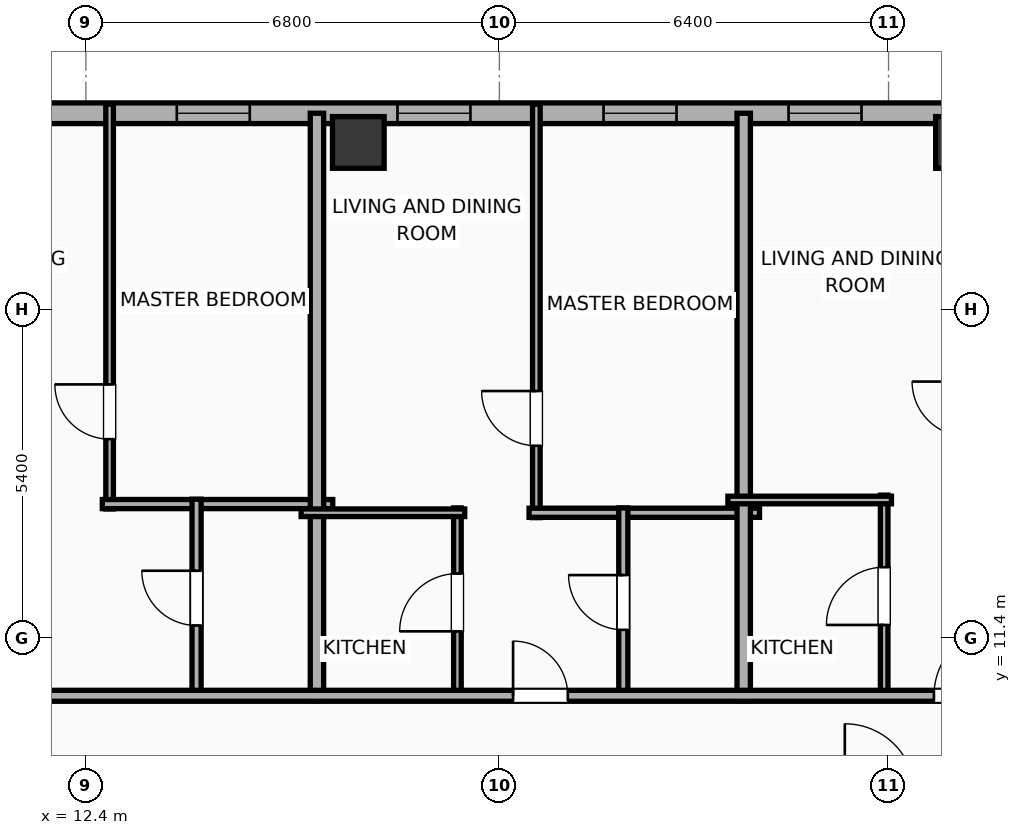
"""IFC4 building model, lengths in metres.
Left out: names, types, materials, properties, quantities, classifications, styles, units other than length and angle.
Written with IfcOpenShell. Run it as: python <this file> out.ifc"""

import sys

from ifc_helpers import new_model, si_unit, direction, frame, frame_2d, origin, origin_2d, place, context, subcontext, project, spatial, rectangle, hollow_rectangle, extrude, element, fill, save


model = new_model("IFC4")
c1 = context("Model", 3, precision=1e-05, world=origin(), true_north=direction((0.0, 1.0)))
c2 = subcontext(c1, "Body", "Model", "MODEL_VIEW")
j1 = project(units=[si_unit("LENGTHUNIT", "METRE"), si_unit("PLANEANGLEUNIT", "RADIAN")], contexts=[c1])
p1 = place(None, origin())
s1 = spatial("IfcSite", under=j1, at=p1, CompositionType="ELEMENT")
p2 = place(p1, origin())
s2 = spatial("IfcBuilding", under=s1, at=p2, CompositionType="ELEMENT")
p3 = place(p2, frame((0.0, 0.0, 204.1)))
s3 = spatial("IfcBuildingStorey", under=s2, at=p3, CompositionType="ELEMENT", Elevation=204.1)
for number, where, z_axis, x_axis in (
    (1, (26.8, 19.55, 0.0), (0.0, 0.0, 1.0), (1.0, 0.0, 0.0)),
    (2, (16.88, 19.55, 0.0), (0.0, 0.0, 1.0), (1.0, 0.0, 0.0)),
):
    element("IfcColumn", number, at=place(p3, frame(where, z_axis=z_axis, x_axis=x_axis)), inside=s3, PredefinedType="COLUMN", context=c2, shape_type="SweptSolid", body=[
        extrude(hollow_rectangle(XDim=0.85, YDim=0.85, WallThickness=0.028, at=origin_2d()), origin(), (0.0, 0.0, 1.0), 3.9),
    ])
p4 = place(p3, frame((-22.783, 20.03, 0.0), z_axis=(0.0, 0.0, 1.0), x_axis=(1.0, 0.0, 0.0)))
e3 = element("IfcWall", 3, at=p4, inside=s3, PredefinedType="ELEMENTEDWALL", context=c2, shape_type="SweptSolid", body=[
    extrude(rectangle(XDim=49.566, YDim=0.34, at=frame_2d((24.783, 0.0))), origin(), (0.0, 0.0, 1.0), 3.65),
])
p5 = place(p4, frame((6.211, 0.0, 0.75)))
e4 = element("IfcOpeningElement", 4, at=p5, cuts=e3, PredefinedType="OPENING", context=c2, shape_type="SweptSolid", body=[
    extrude(rectangle(XDim=2.4, YDim=2.1, at=frame_2d((1.2, 1.05))), frame((0.0, 0.18, 0.0), z_axis=(0.0, -1.0, 0.0), x_axis=(1.0, 0.0, 0.0)), (0.0, 0.0, 1.0), 0.36),
])
p6 = place(p4, frame((22.733, 0.0, 0.75)))
e5 = element("IfcOpeningElement", 5, at=p6, cuts=e3, PredefinedType="OPENING", context=c2, shape_type="SweptSolid", body=[
    extrude(rectangle(XDim=2.4, YDim=2.1, at=frame_2d((1.2, 1.05))), frame((0.0, 0.18, 0.0), z_axis=(0.0, -1.0, 0.0), x_axis=(1.0, 0.0, 0.0)), (0.0, 0.0, 1.0), 0.36),
])
p7 = place(p4, frame((1.132, 0.0, 0.75)))
e6 = element("IfcOpeningElement", 6, at=p7, cuts=e3, PredefinedType="OPENING", context=c2, shape_type="SweptSolid", body=[
    extrude(rectangle(XDim=1.2, YDim=2.05, at=frame_2d((0.6, 1.025))), frame((0.0, 0.18, 0.0), z_axis=(0.0, -1.0, 0.0), x_axis=(1.0, 0.0, 0.0)), (0.0, 0.0, 1.0), 0.36),
])
p8 = place(p4, frame((3.678, 0.0, 0.75)))
e7 = element("IfcOpeningElement", 7, at=p8, cuts=e3, PredefinedType="OPENING", context=c2, shape_type="SweptSolid", body=[
    extrude(rectangle(XDim=1.2, YDim=2.05, at=frame_2d((0.6, 1.025))), frame((0.0, 0.18, 0.0), z_axis=(0.0, -1.0, 0.0), x_axis=(1.0, 0.0, 0.0)), (0.0, 0.0, 1.0), 0.36),
])
p9 = place(p4, frame((14.804, 0.0, 0.75)))
e8 = element("IfcOpeningElement", 8, at=p9, cuts=e3, PredefinedType="OPENING", context=c2, shape_type="SweptSolid", body=[
    extrude(rectangle(XDim=1.2, YDim=2.05, at=frame_2d((0.6, 1.025))), frame((0.0, 0.18, 0.0), z_axis=(0.0, -1.0, 0.0), x_axis=(1.0, 0.0, 0.0)), (0.0, 0.0, 1.0), 0.36),
])
p10 = place(p4, frame((12.054, 0.0, 0.75)))
e9 = element("IfcOpeningElement", 9, at=p10, cuts=e3, PredefinedType="OPENING", context=c2, shape_type="SweptSolid", body=[
    extrude(rectangle(XDim=1.2, YDim=2.05, at=frame_2d((0.6, 1.025))), frame((0.0, 0.18, 0.0), z_axis=(0.0, -1.0, 0.0), x_axis=(1.0, 0.0, 0.0)), (0.0, 0.0, 1.0), 0.36),
])
p11 = place(p4, frame((17.933, 0.0, 0.75)))
e10 = element("IfcOpeningElement", 10, at=p11, cuts=e3, PredefinedType="OPENING", context=c2, shape_type="SweptSolid", body=[
    extrude(rectangle(XDim=1.2, YDim=2.05, at=frame_2d((0.6, 1.025))), frame((0.0, 0.18, 0.0), z_axis=(0.0, -1.0, 0.0), x_axis=(1.0, 0.0, 0.0)), (0.0, 0.0, 1.0), 0.36),
])
p12 = place(p4, frame((26.278, 0.0, 0.75)))
e11 = element("IfcOpeningElement", 11, at=p12, cuts=e3, PredefinedType="OPENING", context=c2, shape_type="SweptSolid", body=[
    extrude(rectangle(XDim=1.2, YDim=2.05, at=frame_2d((0.6, 1.025))), frame((0.0, 0.18, 0.0), z_axis=(0.0, -1.0, 0.0), x_axis=(1.0, 0.0, 0.0)), (0.0, 0.0, 1.0), 0.36),
])
p13 = place(p4, frame((32.677, 0.0, 0.75)))
e12 = element("IfcOpeningElement", 12, at=p13, cuts=e3, PredefinedType="OPENING", context=c2, shape_type="SweptSolid", body=[
    extrude(rectangle(XDim=1.2, YDim=2.05, at=frame_2d((0.6, 1.025))), frame((0.0, 0.18, 0.0), z_axis=(0.0, -1.0, 0.0), x_axis=(1.0, 0.0, 0.0)), (0.0, 0.0, 1.0), 0.36),
])
p14 = place(p4, frame((28.217, 0.0, 0.75)))
e13 = element("IfcOpeningElement", 13, at=p14, cuts=e3, PredefinedType="OPENING", context=c2, shape_type="SweptSolid", body=[
    extrude(rectangle(XDim=0.85, YDim=2.05, at=frame_2d((0.425, 1.025))), frame((0.0, 0.18, 0.0), z_axis=(0.0, -1.0, 0.0), x_axis=(1.0, 0.0, 0.0)), (0.0, 0.0, 1.0), 0.36),
])
p15 = place(p4, frame((36.678, 0.0, 0.75)))
e14 = element("IfcOpeningElement", 14, at=p15, cuts=e3, PredefinedType="OPENING", context=c2, shape_type="SweptSolid", body=[
    extrude(rectangle(XDim=1.2, YDim=2.05, at=frame_2d((0.6, 1.025))), frame((0.0, 0.18, 0.0), z_axis=(0.0, -1.0, 0.0), x_axis=(1.0, 0.0, 0.0)), (0.0, 0.0, 1.0), 0.36),
])
p16 = place(p4, frame((40.307, 0.0, 0.75)))
e15 = element("IfcOpeningElement", 15, at=p16, cuts=e3, PredefinedType="OPENING", context=c2, shape_type="SweptSolid", body=[
    extrude(rectangle(XDim=1.2, YDim=2.05, at=frame_2d((0.6, 1.025))), frame((0.0, 0.18, 0.0), z_axis=(0.0, -1.0, 0.0), x_axis=(1.0, 0.0, 0.0)), (0.0, 0.0, 1.0), 0.36),
])
p17 = place(p4, frame((43.696, 0.0, 0.75)))
e16 = element("IfcOpeningElement", 16, at=p17, cuts=e3, PredefinedType="OPENING", context=c2, shape_type="SweptSolid", body=[
    extrude(rectangle(XDim=1.2, YDim=2.05, at=frame_2d((0.6, 1.025))), frame((0.0, 0.18, 0.0), z_axis=(0.0, -1.0, 0.0), x_axis=(1.0, 0.0, 0.0)), (0.0, 0.0, 1.0), 0.36),
])
p18 = place(p4, frame((46.739, 0.0, 0.75)))
e17 = element("IfcOpeningElement", 17, at=p18, cuts=e3, PredefinedType="OPENING", context=c2, shape_type="SweptSolid", body=[
    extrude(rectangle(XDim=1.2, YDim=2.05, at=frame_2d((0.6, 1.025))), frame((0.0, 0.18, 0.0), z_axis=(0.0, -1.0, 0.0), x_axis=(1.0, 0.0, 0.0)), (0.0, 0.0, 1.0), 0.36),
])
p19 = place(p3, frame((12.79, 13.523, 0.0), z_axis=(0.0, 0.0, 1.0), x_axis=(0.0, 1.0, 0.0)))
e18 = element("IfcWall", 18, at=p19, inside=s3, PredefinedType="PARTITIONING", context=c2, shape_type="SweptSolid", body=[
    extrude(rectangle(XDim=6.657, YDim=0.125, at=frame_2d((3.329, 0.0))), origin(), (0.0, 0.0, 1.0), 3.65),
])
p20 = place(p19, frame((1.148, 0.0, 0.0)))
e19 = element("IfcOpeningElement", 19, at=p20, cuts=e18, PredefinedType="OPENING", context=c2, shape_type="SweptSolid", body=[
    extrude(rectangle(XDim=0.9, YDim=2.05, at=frame_2d((0.45, 1.025))), frame((0.0, 0.073, 0.0), z_axis=(0.0, -1.0, 0.0), x_axis=(1.0, 0.0, 0.0)), (0.0, 0.0, 1.0), 0.145),
])
p21 = place(p3, frame((12.67, 13.603, 0.0), z_axis=(0.0, 0.0, 1.0), x_axis=(1.0, 0.0, 0.0)))
e20 = element("IfcWall", 20, at=p21, inside=s3, PredefinedType="PLUMBINGWALL", context=c2, shape_type="SweptSolid", body=[
    extrude(rectangle(XDim=3.79, YDim=0.15, at=frame_2d((1.895, 0.0))), origin(), (0.0, 0.0, 1.0), 3.65),
])
p22 = place(p3, frame((14.22, 10.43, 0.0), z_axis=(0.0, 0.0, 1.0), x_axis=(0.0, 1.0, 0.0)))
e21 = element("IfcWall", 21, at=p22, inside=s3, PredefinedType="PLUMBINGWALL", context=c2, shape_type="SweptSolid", body=[
    extrude(rectangle(XDim=3.253, YDim=0.15, at=frame_2d((1.626, 0.0))), origin(), (0.0, 0.0, 1.0), 3.65),
])
p23 = place(p22, frame((1.177, 0.0, 0.0)))
e22 = element("IfcOpeningElement", 22, at=p23, cuts=e21, PredefinedType="OPENING", context=c2, shape_type="SweptSolid", body=[
    extrude(rectangle(XDim=0.9, YDim=2.05, at=frame_2d((0.45, 1.025))), frame((0.0, 0.085, 0.0), z_axis=(0.0, -1.0, 0.0), x_axis=(1.0, 0.0, 0.0)), (0.0, 0.0, 1.0), 0.17),
])
p24 = place(p3, frame((16.2, 10.37, 0.0), z_axis=(0.0, 0.0, 1.0), x_axis=(0.0, 1.0, 0.0)))
e23 = element("IfcWall", 23, at=p24, inside=s3, PredefinedType="PARTITIONING", context=c2, shape_type="SweptSolid", body=[
    extrude(rectangle(XDim=9.66, YDim=0.22, at=frame_2d((4.83, 0.0))), origin(), (0.0, 0.0, 1.0), 3.09),
])
p25 = place(p3, frame((19.808, 13.38, 0.0), z_axis=(0.0, 0.0, 1.0), x_axis=(0.0, 1.0, 0.0)))
e24 = element("IfcWall", 24, at=p25, inside=s3, PredefinedType="PARTITIONING", context=c2, shape_type="SweptSolid", body=[
    extrude(rectangle(XDim=6.8, YDim=0.125, at=frame_2d((3.4, 0.0))), origin(), (0.0, 0.0, 1.0), 3.65),
])
p26 = place(p25, frame((1.182, 0.0, 0.0)))
e25 = element("IfcOpeningElement", 25, at=p26, cuts=e24, PredefinedType="OPENING", context=c2, shape_type="SweptSolid", body=[
    extrude(rectangle(XDim=0.9, YDim=2.05, at=frame_2d((0.45, 1.025))), frame((0.0, 0.073, 0.0), z_axis=(0.0, -1.0, 0.0), x_axis=(1.0, 0.0, 0.0)), (0.0, 0.0, 1.0), 0.145),
])
p27 = place(p3, frame((19.688, 13.46, 0.0), z_axis=(0.0, 0.0, 1.0), x_axis=(1.0, 0.0, 0.0)))
e26 = element("IfcWall", 26, at=p27, inside=s3, PredefinedType="PLUMBINGWALL", context=c2, shape_type="SweptSolid", body=[
    extrude(rectangle(XDim=3.79, YDim=0.15, at=frame_2d((1.895, 0.0))), origin(), (0.0, 0.0, 1.0), 3.65),
])
p28 = place(p3, frame((18.51, 10.43, 0.0), z_axis=(0.0, 0.0, 1.0), x_axis=(0.0, 1.0, 0.0)))
e27 = element("IfcWall", 27, at=p28, inside=s3, PredefinedType="PARTITIONING", context=c2, shape_type="SweptSolid", body=[
    extrude(rectangle(XDim=3.11, YDim=0.125, at=frame_2d((1.555, 0.0))), origin(), (0.0, 0.0, 1.0), 3.65),
])
p29 = place(p28, frame((1.08, 0.0, 0.0)))
e28 = element("IfcOpeningElement", 28, at=p29, cuts=e27, PredefinedType="OPENING", context=c2, shape_type="SweptSolid", body=[
    extrude(rectangle(XDim=0.95, YDim=2.05, at=frame_2d((0.475, 1.025))), frame((0.0, 0.073, 0.0), z_axis=(0.0, -1.0, 0.0), x_axis=(1.0, 0.0, 0.0)), (0.0, 0.0, 1.0), 0.145),
])
p30 = place(p3, frame((15.94, 13.46, 0.0), z_axis=(0.0, 0.0, 1.0), x_axis=(1.0, 0.0, 0.0)))
e29 = element("IfcWall", 29, at=p30, inside=s3, PredefinedType="PARTITIONING", context=c2, shape_type="SweptSolid", body=[
    extrude(rectangle(XDim=2.69, YDim=0.125, at=frame_2d((1.345, 0.0))), origin(), (0.0, 0.0, 1.0), 3.65),
])
p31 = place(p3, frame((21.238, 10.43, 0.0), z_axis=(0.0, 0.0, 1.0), x_axis=(0.0, 1.0, 0.0)))
e30 = element("IfcWall", 30, at=p31, inside=s3, PredefinedType="PLUMBINGWALL", context=c2, shape_type="SweptSolid", body=[
    extrude(rectangle(XDim=3.11, YDim=0.15, at=frame_2d((1.555, 0.0))), origin(), (0.0, 0.0, 1.0), 3.65),
])
p32 = place(p31, frame((1.105, 0.0, 0.0)))
e31 = element("IfcOpeningElement", 31, at=p32, cuts=e30, PredefinedType="OPENING", context=c2, shape_type="SweptSolid", body=[
    extrude(rectangle(XDim=0.9, YDim=2.05, at=frame_2d((0.45, 1.025))), frame((0.0, 0.085, 0.0), z_axis=(0.0, -1.0, 0.0), x_axis=(1.0, 0.0, 0.0)), (0.0, 0.0, 1.0), 0.17),
])
p33 = place(p3, frame((23.218, 10.37, 0.0), z_axis=(0.0, 0.0, 1.0), x_axis=(0.0, 1.0, 0.0)))
e32 = element("IfcWall", 32, at=p33, inside=s3, PredefinedType="PARTITIONING", context=c2, shape_type="SweptSolid", body=[
    extrude(rectangle(XDim=9.66, YDim=0.22, at=frame_2d((4.83, 0.0))), origin(), (0.0, 0.0, 1.0), 3.65),
])
p34 = place(p3, frame((25.528, 10.43, 0.0), z_axis=(0.0, 0.0, 1.0), x_axis=(0.0, 1.0, 0.0)))
e33 = element("IfcWall", 33, at=p34, inside=s3, PredefinedType="PARTITIONING", context=c2, shape_type="SweptSolid", body=[
    extrude(rectangle(XDim=3.32, YDim=0.125, at=frame_2d((1.66, 0.0))), origin(), (0.0, 0.0, 1.0), 3.65),
])
p35 = place(p34, frame((1.185, 0.0, 0.0)))
e34 = element("IfcOpeningElement", 34, at=p35, cuts=e33, PredefinedType="OPENING", context=c2, shape_type="SweptSolid", body=[
    extrude(rectangle(XDim=0.95, YDim=2.05, at=frame_2d((0.475, 1.025))), frame((0.0, 0.073, 0.0), z_axis=(0.0, -1.0, 0.0), x_axis=(1.0, 0.0, 0.0)), (0.0, 0.0, 1.0), 0.145),
])
p36 = place(p3, frame((22.958, 13.67, 0.0), z_axis=(0.0, 0.0, 1.0), x_axis=(1.0, 0.0, 0.0)))
e35 = element("IfcWall", 35, at=p36, inside=s3, PredefinedType="PARTITIONING", context=c2, shape_type="SweptSolid", body=[
    extrude(rectangle(XDim=2.69, YDim=0.125, at=frame_2d((1.345, 0.0))), origin(), (0.0, 0.0, 1.0), 3.65),
])
p37 = place(p3, frame((-26.23, 10.45, 0.0), z_axis=(0.0, 0.0, 1.0), x_axis=(1.0, 0.0, 0.0)))
e36 = element("IfcWall", 36, at=p37, inside=s3, PredefinedType="PARTITIONING", context=c2, shape_type="SweptSolid", body=[
    extrude(rectangle(XDim=56.46, YDim=0.18, at=frame_2d((28.23, 0.0))), origin(), (0.0, 0.0, 1.0), 3.65),
])
p38 = place(p37, frame((4.41, 0.0, 0.0)))
e37 = element("IfcOpeningElement", 37, at=p38, cuts=e36, PredefinedType="OPENING", context=c2, shape_type="SweptSolid", body=[
    extrude(rectangle(XDim=1.15, YDim=2.05, at=frame_2d((0.575, 1.025))), frame((0.0, 0.1, 0.0), z_axis=(0.0, -1.0, 0.0), x_axis=(1.0, 0.0, 0.0)), (0.0, 0.0, 1.0), 0.2),
])
p39 = place(p37, frame((11.943, 0.0, 0.0)))
e38 = element("IfcOpeningElement", 38, at=p39, cuts=e36, PredefinedType="OPENING", context=c2, shape_type="SweptSolid", body=[
    extrude(rectangle(XDim=0.9, YDim=2.05, at=frame_2d((0.45, 1.025))), frame((0.0, 0.1, 0.0), z_axis=(0.0, -1.0, 0.0), x_axis=(1.0, 0.0, 0.0)), (0.0, 0.0, 1.0), 0.2),
])
p40 = place(p37, frame((18.243, 0.0, 0.0)))
e39 = element("IfcOpeningElement", 39, at=p40, cuts=e36, PredefinedType="OPENING", context=c2, shape_type="SweptSolid", body=[
    extrude(rectangle(XDim=1.15, YDim=2.05, at=frame_2d((0.575, 1.025))), frame((0.0, 0.1, 0.0), z_axis=(0.0, -1.0, 0.0), x_axis=(1.0, 0.0, 0.0)), (0.0, 0.0, 1.0), 0.2),
])
p41 = place(p37, frame((22.941, 0.0, 0.0)))
e40 = element("IfcOpeningElement", 40, at=p41, cuts=e36, PredefinedType="OPENING", context=c2, shape_type="SweptSolid", body=[
    extrude(rectangle(XDim=0.9, YDim=2.05, at=frame_2d((0.45, 1.025))), frame((0.0, 0.1, 0.0), z_axis=(0.0, -1.0, 0.0), x_axis=(1.0, 0.0, 0.0)), (0.0, 0.0, 1.0), 0.2),
])
p42 = place(p37, frame((27.028, 0.0, 0.0)))
e41 = element("IfcOpeningElement", 41, at=p42, cuts=e36, PredefinedType="OPENING", context=c2, shape_type="SweptSolid", body=[
    extrude(rectangle(XDim=1.15, YDim=2.05, at=frame_2d((0.575, 1.025))), frame((0.0, 0.1, 0.0), z_axis=(0.0, -1.0, 0.0), x_axis=(1.0, 0.0, 0.0)), (0.0, 0.0, 1.0), 0.2),
])
p43 = place(p37, frame((36.864, 0.0, 0.0)))
e42 = element("IfcOpeningElement", 42, at=p43, cuts=e36, PredefinedType="OPENING", context=c2, shape_type="SweptSolid", body=[
    extrude(rectangle(XDim=1.15, YDim=2.05, at=frame_2d((0.575, 1.025))), frame((0.0, 0.1, 0.0), z_axis=(0.0, -1.0, 0.0), x_axis=(1.0, 0.0, 0.0)), (0.0, 0.0, 1.0), 0.2),
])
p44 = place(p37, frame((45.655, 0.0, 0.0)))
e43 = element("IfcOpeningElement", 43, at=p44, cuts=e36, PredefinedType="OPENING", context=c2, shape_type="SweptSolid", body=[
    extrude(rectangle(XDim=0.9, YDim=2.05, at=frame_2d((0.45, 1.025))), frame((0.0, 0.1, 0.0), z_axis=(0.0, -1.0, 0.0), x_axis=(1.0, 0.0, 0.0)), (0.0, 0.0, 1.0), 0.2),
])
p45 = place(p37, frame((52.576, 0.0, 0.0)))
e44 = element("IfcOpeningElement", 44, at=p45, cuts=e36, PredefinedType="OPENING", context=c2, shape_type="SweptSolid", body=[
    extrude(rectangle(XDim=1.15, YDim=2.05, at=frame_2d((0.575, 1.025))), frame((0.0, 0.1, 0.0), z_axis=(0.0, -1.0, 0.0), x_axis=(1.0, 0.0, 0.0)), (0.0, 0.0, 1.0), 0.2),
])
p46 = place(p15, origin())
e45 = element("IfcWindow", 45, at=p46, inside=s3, PartitioningType="SINGLE_PANEL", PredefinedType="WINDOW", context=c2, shape_type="SweptSolid", body=[
    extrude(rectangle(XDim=1.2, YDim=2.05, at=frame_2d((0.6, 1.025))), frame((0.0, 0.03, 0.0), z_axis=(0.0, -1.0, 0.0), x_axis=(1.0, 0.0, 0.0)), (0.0, 0.0, 1.0), 0.06),
])
fill(e14, e45)
p47 = place(p16, origin())
e46 = element("IfcWindow", 46, at=p47, inside=s3, PartitioningType="SINGLE_PANEL", PredefinedType="WINDOW", context=c2, shape_type="SweptSolid", body=[
    extrude(rectangle(XDim=1.2, YDim=2.05, at=frame_2d((0.6, 1.025))), frame((0.0, 0.03, 0.0), z_axis=(0.0, -1.0, 0.0), x_axis=(1.0, 0.0, 0.0)), (0.0, 0.0, 1.0), 0.06),
])
fill(e15, e46)
p48 = place(p17, origin())
e47 = element("IfcWindow", 47, at=p48, inside=s3, PartitioningType="SINGLE_PANEL", PredefinedType="WINDOW", context=c2, shape_type="SweptSolid", body=[
    extrude(rectangle(XDim=1.2, YDim=2.05, at=frame_2d((0.6, 1.025))), frame((0.0, 0.03, 0.0), z_axis=(0.0, -1.0, 0.0), x_axis=(1.0, 0.0, 0.0)), (0.0, 0.0, 1.0), 0.06),
])
fill(e16, e47)
p49 = place(p18, origin())
e48 = element("IfcWindow", 48, at=p49, inside=s3, PartitioningType="SINGLE_PANEL", PredefinedType="WINDOW", context=c2, shape_type="SweptSolid", body=[
    extrude(rectangle(XDim=1.2, YDim=2.05, at=frame_2d((0.6, 1.025))), frame((0.0, 0.03, 0.0), z_axis=(0.0, -1.0, 0.0), x_axis=(1.0, 0.0, 0.0)), (0.0, 0.0, 1.0), 0.06),
])
fill(e17, e48)
p50 = place(p20, origin())
e49 = element("IfcDoor", 49, at=p50, inside=s3, OperationType="SINGLE_SWING_RIGHT", PredefinedType="DOOR", context=c2, shape_type="SweptSolid", body=[
    extrude(rectangle(XDim=0.9, YDim=2.05, at=frame_2d((0.45, 1.025))), frame((0.0, 0.025, 0.0), z_axis=(0.0, -1.0, 0.0), x_axis=(1.0, 0.0, 0.0)), (0.0, 0.0, 1.0), 0.05),
])
fill(e19, e49)
p51 = place(p23, origin())
e50 = element("IfcDoor", 50, at=p51, inside=s3, OperationType="SINGLE_SWING_RIGHT", PredefinedType="DOOR", context=c2, shape_type="SweptSolid", body=[
    extrude(rectangle(XDim=0.9, YDim=2.05, at=frame_2d((0.45, 1.025))), frame((0.0, 0.025, 0.0), z_axis=(0.0, -1.0, 0.0), x_axis=(1.0, 0.0, 0.0)), (0.0, 0.0, 1.0), 0.05),
])
fill(e22, e50)
p52 = place(p26, origin())
e51 = element("IfcDoor", 51, at=p52, inside=s3, OperationType="SINGLE_SWING_RIGHT", PredefinedType="DOOR", context=c2, shape_type="SweptSolid", body=[
    extrude(rectangle(XDim=0.9, YDim=2.05, at=frame_2d((0.45, 1.025))), frame((0.0, 0.025, 0.0), z_axis=(0.0, -1.0, 0.0), x_axis=(1.0, 0.0, 0.0)), (0.0, 0.0, 1.0), 0.05),
])
fill(e25, e51)
p53 = place(p29, origin())
e52 = element("IfcDoor", 52, at=p53, inside=s3, OperationType="SINGLE_SWING_LEFT", PredefinedType="DOOR", context=c2, shape_type="SweptSolid", body=[
    extrude(rectangle(XDim=0.95, YDim=2.05, at=frame_2d((0.475, 1.025))), frame((0.0, 0.025, 0.0), z_axis=(0.0, -1.0, 0.0), x_axis=(1.0, 0.0, 0.0)), (0.0, 0.0, 1.0), 0.05),
])
fill(e28, e52)
p54 = place(p32, origin())
e53 = element("IfcDoor", 53, at=p54, inside=s3, OperationType="SINGLE_SWING_RIGHT", PredefinedType="DOOR", context=c2, shape_type="SweptSolid", body=[
    extrude(rectangle(XDim=0.9, YDim=2.05, at=frame_2d((0.45, 1.025))), frame((0.0, 0.025, 0.0), z_axis=(0.0, -1.0, 0.0), x_axis=(1.0, 0.0, 0.0)), (0.0, 0.0, 1.0), 0.05),
])
fill(e31, e53)
p55 = place(p35, origin())
e54 = element("IfcDoor", 54, at=p55, inside=s3, OperationType="SINGLE_SWING_LEFT", PredefinedType="DOOR", context=c2, shape_type="SweptSolid", body=[
    extrude(rectangle(XDim=0.95, YDim=2.05, at=frame_2d((0.475, 1.025))), frame((0.0, 0.025, 0.0), z_axis=(0.0, -1.0, 0.0), x_axis=(1.0, 0.0, 0.0)), (0.0, 0.0, 1.0), 0.05),
])
fill(e34, e54)
p56 = place(p44, origin())
e55 = element("IfcDoor", 55, at=p56, inside=s3, OperationType="SINGLE_SWING_LEFT", PredefinedType="DOOR", context=c2, shape_type="SweptSolid", body=[
    extrude(rectangle(XDim=0.9, YDim=2.05, at=frame_2d((0.45, 1.025))), frame((0.0, 0.025, 0.0), z_axis=(0.0, -1.0, 0.0), x_axis=(1.0, 0.0, 0.0)), (0.0, 0.0, 1.0), 0.05),
])
fill(e43, e55)
p57 = place(p45, origin())
e56 = element("IfcDoor", 56, at=p57, inside=s3, OperationType="SINGLE_SWING_RIGHT", PredefinedType="DOOR", context=c2, shape_type="SweptSolid", body=[
    extrude(rectangle(XDim=1.15, YDim=2.05, at=frame_2d((0.575, 1.025))), frame((0.0, 0.025, 0.0), z_axis=(0.0, -1.0, 0.0), x_axis=(1.0, 0.0, 0.0)), (0.0, 0.0, 1.0), 0.05),
])
fill(e44, e56)
save(model, sys.argv[1])
